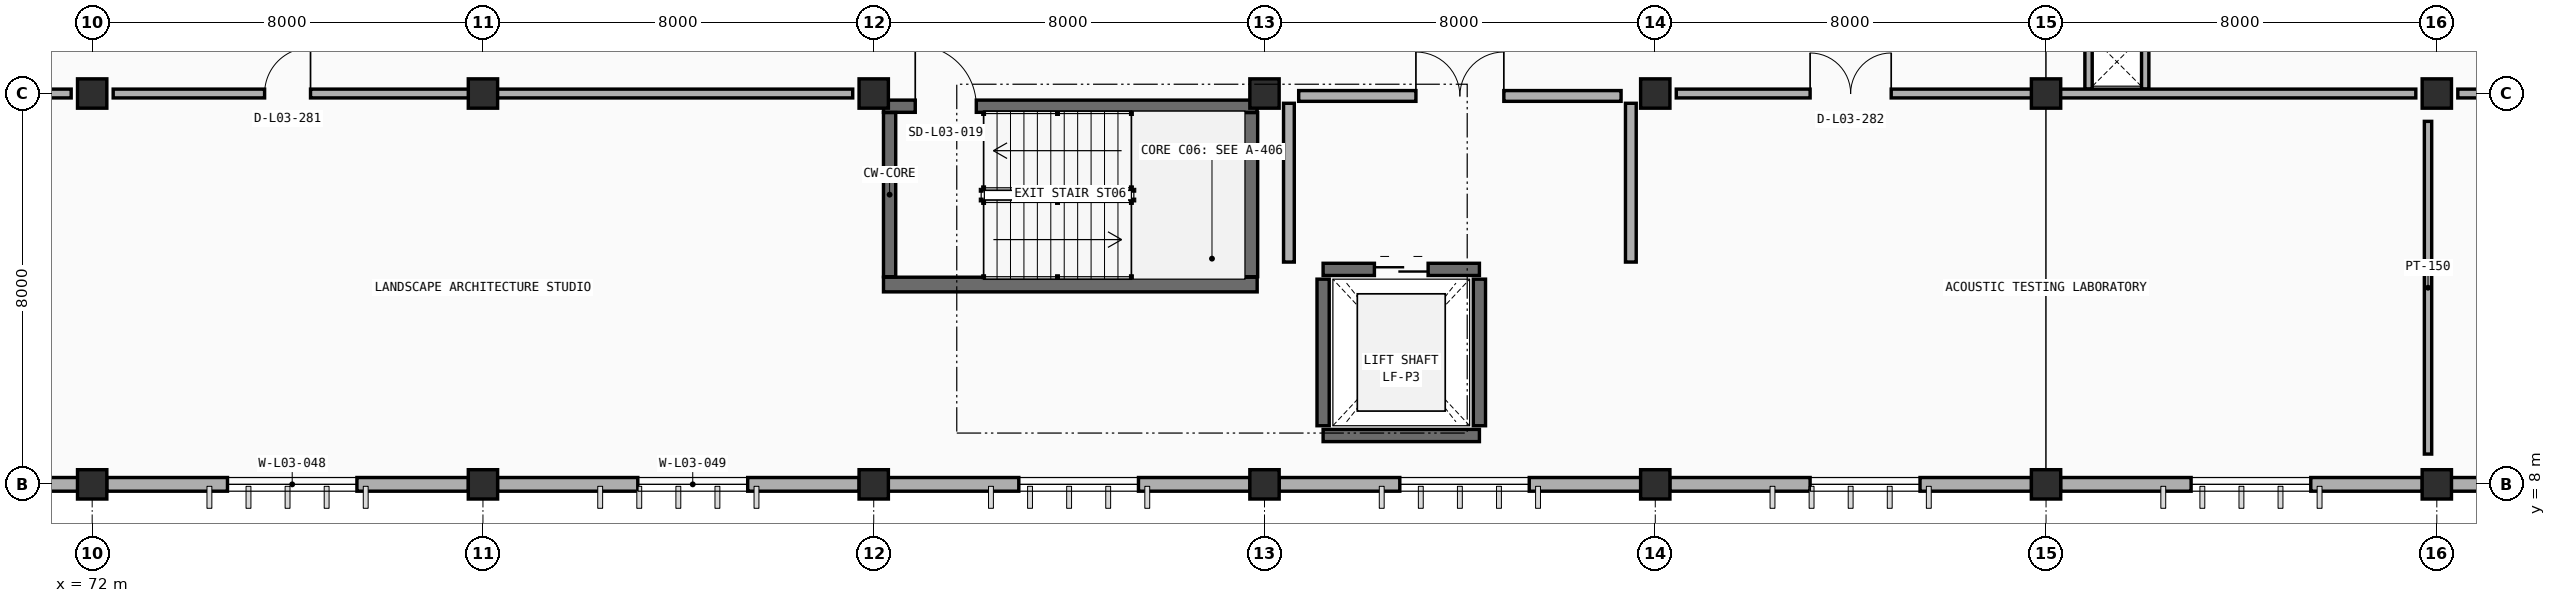
"""IFC4 building model, lengths in metres.
Left out: names, types, materials, properties, quantities, classifications, styles, units other than length and angle.
Written with IfcOpenShell. Run it as: python <this file> out.ifc"""

import sys

from ifc_helpers import new_model, si_unit, direction, frame, frame_2d, origin, origin_2d, place, context, subcontext, project, spatial, rectangle, extrude, element, fill, save


model = new_model("IFC4")
c1 = context("Model", 3, precision=1e-05, world=origin(), true_north=direction((0.0, 1.0)))
c2 = subcontext(c1, "Body", "Model", "MODEL_VIEW")
j1 = project(units=[si_unit("LENGTHUNIT", "METRE"), si_unit("PLANEANGLEUNIT", "RADIAN")], contexts=[c1])
p1 = place(None, origin())
s1 = spatial("IfcSite", under=j1, at=p1, CompositionType="ELEMENT")
p2 = place(p1, origin())
s2 = spatial("IfcBuilding", under=s1, at=p2, CompositionType="ELEMENT")
p3 = place(p2, frame((0.0, 0.0, 9.6)))
s3 = spatial("IfcBuildingStorey", under=s2, at=p3, CompositionType="ELEMENT", Elevation=9.6)
for number, where, z_axis, x_axis in (
    (1, (72.0, 8.0, 0.0), (0.0, 0.0, 1.0), (1.0, 0.0, 0.0)),
    (2, (80.0, 8.0, 0.0), (0.0, 0.0, 1.0), (1.0, 0.0, 0.0)),
    (3, (88.0, 8.0, 0.0), (0.0, 0.0, 1.0), (1.0, 0.0, 0.0)),
    (4, (96.0, 8.0, 0.0), (0.0, 0.0, 1.0), (1.0, 0.0, 0.0)),
    (5, (104.0, 8.0, 0.0), (0.0, 0.0, 1.0), (1.0, 0.0, 0.0)),
    (6, (112.0, 8.0, 0.0), (0.0, 0.0, 1.0), (1.0, 0.0, 0.0)),
    (7, (120.0, 8.0, 0.0), (0.0, 0.0, 1.0), (1.0, 0.0, 0.0)),
    (8, (72.0, 16.0, 0.0), (0.0, 0.0, 1.0), (1.0, 0.0, 0.0)),
    (9, (80.0, 16.0, 0.0), (0.0, 0.0, 1.0), (1.0, 0.0, 0.0)),
    (10, (88.0, 16.0, 0.0), (0.0, 0.0, 1.0), (1.0, 0.0, 0.0)),
    (11, (96.0, 16.0, 0.0), (0.0, 0.0, 1.0), (1.0, 0.0, 0.0)),
    (12, (104.0, 16.0, 0.0), (0.0, 0.0, 1.0), (1.0, 0.0, 0.0)),
    (13, (112.0, 16.0, 0.0), (0.0, 0.0, 1.0), (1.0, 0.0, 0.0)),
    (14, (120.0, 16.0, 0.0), (0.0, 0.0, 1.0), (1.0, 0.0, 0.0)),
):
    element("IfcColumn", number, at=place(p3, frame(where, z_axis=z_axis, x_axis=x_axis)), inside=s3, PredefinedType="COLUMN", context=c2, shape_type="SweptSolid", body=[
        extrude(rectangle(XDim=0.6, YDim=0.6, at=origin_2d()), origin(), (0.0, 0.0, 1.0), 4.2),
    ])
p4 = place(p3, frame((71.703, 8.0, 0.0), z_axis=(0.0, 0.0, 1.0), x_axis=(-1.0, 0.0, 0.0)))
e15 = element("IfcWall", 15, at=p4, inside=s3, PredefinedType="STANDARD", context=c2, shape_type="SweptSolid", body=[
    extrude(rectangle(XDim=7.406, YDim=0.28, at=frame_2d((3.703, 0.0))), origin(), (0.0, 0.0, 1.0), 3.325),
])
p5 = place(p4, frame((2.283, 0.0, 0.9)))
e16 = element("IfcOpeningElement", 16, at=p5, cuts=e15, PredefinedType="OPENING", context=c2, shape_type="SweptSolid", body=[
    extrude(rectangle(XDim=2.45, YDim=1.25, at=frame_2d((1.225, 0.625))), frame((0.0, 0.15, 0.0), z_axis=(0.0, -1.0, 0.0), x_axis=(1.0, 0.0, 0.0)), (0.0, 0.0, 1.0), 0.3),
])
p6 = place(p3, frame((79.703, 8.0, 0.0), z_axis=(0.0, 0.0, 1.0), x_axis=(-1.0, 0.0, 0.0)))
e17 = element("IfcWall", 17, at=p6, inside=s3, PredefinedType="STANDARD", context=c2, shape_type="SweptSolid", body=[
    extrude(rectangle(XDim=7.406, YDim=0.28, at=frame_2d((3.703, 0.0))), origin(), (0.0, 0.0, 1.0), 3.325),
])
p7 = place(p6, frame((2.283, 0.0, 0.9)))
e18 = element("IfcOpeningElement", 18, at=p7, cuts=e17, PredefinedType="OPENING", context=c2, shape_type="SweptSolid", body=[
    extrude(rectangle(XDim=2.65, YDim=1.25, at=frame_2d((1.325, 0.625))), frame((0.0, 0.15, 0.0), z_axis=(0.0, -1.0, 0.0), x_axis=(1.0, 0.0, 0.0)), (0.0, 0.0, 1.0), 0.3),
])
p8 = place(p3, frame((87.703, 8.0, 0.0), z_axis=(0.0, 0.0, 1.0), x_axis=(-1.0, 0.0, 0.0)))
e19 = element("IfcWall", 19, at=p8, inside=s3, PredefinedType="STANDARD", context=c2, shape_type="SweptSolid", body=[
    extrude(rectangle(XDim=7.406, YDim=0.28, at=frame_2d((3.703, 0.0))), origin(), (0.0, 0.0, 1.0), 3.325),
])
p9 = place(p8, frame((2.283, 0.0, 0.9)))
e20 = element("IfcOpeningElement", 20, at=p9, cuts=e19, PredefinedType="OPENING", context=c2, shape_type="SweptSolid", body=[
    extrude(rectangle(XDim=2.25, YDim=1.25, at=frame_2d((1.125, 0.625))), frame((0.0, 0.15, 0.0), z_axis=(0.0, -1.0, 0.0), x_axis=(1.0, 0.0, 0.0)), (0.0, 0.0, 1.0), 0.3),
])
p10 = place(p3, frame((95.703, 8.0, 0.0), z_axis=(0.0, 0.0, 1.0), x_axis=(-1.0, 0.0, 0.0)))
e21 = element("IfcWall", 21, at=p10, inside=s3, PredefinedType="STANDARD", context=c2, shape_type="SweptSolid", body=[
    extrude(rectangle(XDim=7.406, YDim=0.28, at=frame_2d((3.703, 0.0))), origin(), (0.0, 0.0, 1.0), 3.325),
])
p11 = place(p10, frame((2.283, 0.0, 0.9)))
e22 = element("IfcOpeningElement", 22, at=p11, cuts=e21, PredefinedType="OPENING", context=c2, shape_type="SweptSolid", body=[
    extrude(rectangle(XDim=2.45, YDim=1.25, at=frame_2d((1.225, 0.625))), frame((0.0, 0.15, 0.0), z_axis=(0.0, -1.0, 0.0), x_axis=(1.0, 0.0, 0.0)), (0.0, 0.0, 1.0), 0.3),
])
p12 = place(p3, frame((103.703, 8.0, 0.0), z_axis=(0.0, 0.0, 1.0), x_axis=(-1.0, 0.0, 0.0)))
e23 = element("IfcWall", 23, at=p12, inside=s3, PredefinedType="STANDARD", context=c2, shape_type="SweptSolid", body=[
    extrude(rectangle(XDim=7.406, YDim=0.28, at=frame_2d((3.703, 0.0))), origin(), (0.0, 0.0, 1.0), 3.325),
])
p13 = place(p12, frame((2.283, 0.0, 0.9)))
e24 = element("IfcOpeningElement", 24, at=p13, cuts=e23, PredefinedType="OPENING", context=c2, shape_type="SweptSolid", body=[
    extrude(rectangle(XDim=2.65, YDim=1.25, at=frame_2d((1.325, 0.625))), frame((0.0, 0.15, 0.0), z_axis=(0.0, -1.0, 0.0), x_axis=(1.0, 0.0, 0.0)), (0.0, 0.0, 1.0), 0.3),
])
p14 = place(p3, frame((111.703, 8.0, 0.0), z_axis=(0.0, 0.0, 1.0), x_axis=(-1.0, 0.0, 0.0)))
e25 = element("IfcWall", 25, at=p14, inside=s3, PredefinedType="STANDARD", context=c2, shape_type="SweptSolid", body=[
    extrude(rectangle(XDim=7.406, YDim=0.28, at=frame_2d((3.703, 0.0))), origin(), (0.0, 0.0, 1.0), 3.325),
])
p15 = place(p14, frame((2.283, 0.0, 0.9)))
e26 = element("IfcOpeningElement", 26, at=p15, cuts=e25, PredefinedType="OPENING", context=c2, shape_type="SweptSolid", body=[
    extrude(rectangle(XDim=2.25, YDim=1.25, at=frame_2d((1.125, 0.625))), frame((0.0, 0.15, 0.0), z_axis=(0.0, -1.0, 0.0), x_axis=(1.0, 0.0, 0.0)), (0.0, 0.0, 1.0), 0.3),
])
p16 = place(p3, frame((119.703, 8.0, 0.0), z_axis=(0.0, 0.0, 1.0), x_axis=(-1.0, 0.0, 0.0)))
e27 = element("IfcWall", 27, at=p16, inside=s3, PredefinedType="STANDARD", context=c2, shape_type="SweptSolid", body=[
    extrude(rectangle(XDim=7.406, YDim=0.28, at=frame_2d((3.703, 0.0))), origin(), (0.0, 0.0, 1.0), 3.325),
])
p17 = place(p16, frame((2.283, 0.0, 0.9)))
e28 = element("IfcOpeningElement", 28, at=p17, cuts=e27, PredefinedType="OPENING", context=c2, shape_type="SweptSolid", body=[
    extrude(rectangle(XDim=2.45, YDim=1.25, at=frame_2d((1.225, 0.625))), frame((0.0, 0.15, 0.0), z_axis=(0.0, -1.0, 0.0), x_axis=(1.0, 0.0, 0.0)), (0.0, 0.0, 1.0), 0.3),
])
p18 = place(p3, frame((127.703, 8.0, 0.0), z_axis=(0.0, 0.0, 1.0), x_axis=(-1.0, 0.0, 0.0)))
e29 = element("IfcWall", 29, at=p18, inside=s3, PredefinedType="STANDARD", context=c2, shape_type="SweptSolid", body=[
    extrude(rectangle(XDim=7.406, YDim=0.28, at=frame_2d((3.703, 0.0))), origin(), (0.0, 0.0, 1.0), 3.325),
])
p19 = place(p18, frame((2.283, 0.0, 0.9)))
e30 = element("IfcOpeningElement", 30, at=p19, cuts=e29, PredefinedType="OPENING", context=c2, shape_type="SweptSolid", body=[
    extrude(rectangle(XDim=2.65, YDim=1.25, at=frame_2d((1.325, 0.625))), frame((0.0, 0.15, 0.0), z_axis=(0.0, -1.0, 0.0), x_axis=(1.0, 0.0, 0.0)), (0.0, 0.0, 1.0), 0.3),
])
p20 = place(p3, frame((88.2, 12.09, 0.0), z_axis=(0.0, 0.0, 1.0), x_axis=(1.0, 0.0, 0.0)))
e31 = element("IfcWall", 31, at=p20, inside=s3, PredefinedType="SHEAR", context=c2, shape_type="SweptSolid", body=[
    extrude(rectangle(XDim=7.65, YDim=0.3, at=frame_2d((3.825, 0.0))), origin(), (0.0, 0.0, 1.0), 4.2),
])
p21 = place(p3, frame((95.71, 12.25, 0.0), z_axis=(0.0, 0.0, 1.0), x_axis=(0.0, 1.0, 0.0)))
e32 = element("IfcWall", 32, at=p21, inside=s3, PredefinedType="SHEAR", context=c2, shape_type="SweptSolid", body=[
    extrude(rectangle(XDim=3.36, YDim=0.3, at=frame_2d((1.68, 0.0))), origin(), (0.0, 0.0, 1.0), 4.2),
])
p22 = place(p3, frame((88.2, 15.74, 0.0), z_axis=(0.0, 0.0, 1.0), x_axis=(1.0, 0.0, 0.0)))
e33 = element("IfcWall", 33, at=p22, inside=s3, PredefinedType="SOLIDWALL", context=c2, shape_type="SweptSolid", body=[
    extrude(rectangle(XDim=7.65, YDim=0.25, at=frame_2d((3.825, 0.0))), origin(), (0.0, 0.0, 1.0), 4.2),
])
p23 = place(p22, frame((0.65, 0.0, 0.0)))
e34 = element("IfcOpeningElement", 34, at=p23, cuts=e33, PredefinedType="OPENING", context=c2, shape_type="SweptSolid", body=[
    extrude(rectangle(XDim=1.25, YDim=2.15, at=frame_2d((0.625, 1.075))), frame((0.0, 0.135, 0.0), z_axis=(0.0, -1.0, 0.0), x_axis=(1.0, 0.0, 0.0)), (0.0, 0.0, 1.0), 0.27),
])
p24 = place(p3, frame((88.325, 12.25, 0.0), z_axis=(0.0, 0.0, 1.0), x_axis=(0.0, 1.0, 0.0)))
e35 = element("IfcWall", 35, at=p24, inside=s3, PredefinedType="SOLIDWALL", context=c2, shape_type="SweptSolid", body=[
    extrude(rectangle(XDim=3.36, YDim=0.25, at=frame_2d((1.68, 0.0))), origin(), (0.0, 0.0, 1.0), 4.2),
])
p25 = place(p3, frame((97.2, 9.0, 0.0), z_axis=(0.0, 0.0, 1.0), x_axis=(1.0, 0.0, 0.0)))
e36 = element("IfcWall", 36, at=p25, inside=s3, PredefinedType="SOLIDWALL", context=c2, shape_type="SweptSolid", body=[
    extrude(rectangle(XDim=3.2, YDim=0.25, at=frame_2d((1.6, 0.0))), origin(), (0.0, 0.0, 1.0), 4.2),
])
p26 = place(p3, frame((97.2, 12.4, 0.0), z_axis=(0.0, 0.0, 1.0), x_axis=(1.0, 0.0, 0.0)))
e37 = element("IfcWall", 37, at=p26, inside=s3, PredefinedType="SOLIDWALL", context=c2, shape_type="SweptSolid", body=[
    extrude(rectangle(XDim=3.2, YDim=0.25, at=frame_2d((1.6, 0.0))), origin(), (0.0, 0.0, 1.0), 4.2),
])
p27 = place(p26, frame((1.05, 0.0, 0.0)))
e38 = element("IfcOpeningElement", 38, at=p27, cuts=e37, PredefinedType="OPENING", context=c2, shape_type="SweptSolid", body=[
    extrude(rectangle(XDim=1.1, YDim=2.15, at=frame_2d((0.55, 1.075))), frame((0.0, 0.135, 0.0), z_axis=(0.0, -1.0, 0.0), x_axis=(1.0, 0.0, 0.0)), (0.0, 0.0, 1.0), 0.27),
])
for number, where, z_axis, x_axis in (
    (39, (97.2, 9.2, 0.0), (0.0, 0.0, 1.0), (0.0, 1.0, 0.0)),
    (40, (100.4, 9.2, 0.0), (0.0, 0.0, 1.0), (0.0, 1.0, 0.0)),
):
    element("IfcWall", number, at=place(p3, frame(where, z_axis=z_axis, x_axis=x_axis)), inside=s3, PredefinedType="SOLIDWALL", context=c2, shape_type="SweptSolid", body=[
        extrude(rectangle(XDim=3.0, YDim=0.25, at=frame_2d((1.5, 0.0))), origin(), (0.0, 0.0, 1.0), 4.2),
    ])
p28 = place(p3, frame((96.7, 15.95, 0.0), z_axis=(0.0, 0.0, 1.0), x_axis=(1.0, 0.0, 0.0)))
e41 = element("IfcWall", 41, at=p28, inside=s3, PredefinedType="PARTITIONING", context=c2, shape_type="SweptSolid", body=[
    extrude(rectangle(XDim=6.6, YDim=0.22, at=frame_2d((3.3, 0.0))), origin(), (0.0, 0.0, 1.0), 3.275),
])
p29 = place(p28, frame((2.4, 0.0, 0.0)))
e42 = element("IfcOpeningElement", 42, at=p29, cuts=e41, PredefinedType="OPENING", context=c2, shape_type="SweptSolid", body=[
    extrude(rectangle(XDim=1.8, YDim=2.2, at=frame_2d((0.9, 1.1))), frame((0.0, 0.12, 0.0), z_axis=(0.0, -1.0, 0.0), x_axis=(1.0, 0.0, 0.0)), (0.0, 0.0, 1.0), 0.24),
])
for number, where, z_axis, x_axis in (
    (43, (96.5, 12.55, 0.0), (0.0, 0.0, 1.0), (0.0, 1.0, 0.0)),
    (44, (103.5, 12.55, 0.0), (0.0, 0.0, 1.0), (0.0, 1.0, 0.0)),
):
    element("IfcWall", number, at=place(p3, frame(where, z_axis=z_axis, x_axis=x_axis)), inside=s3, PredefinedType="PARTITIONING", context=c2, shape_type="SweptSolid", body=[
        extrude(rectangle(XDim=3.25, YDim=0.22, at=frame_2d((1.625, 0.0))), origin(), (0.0, 0.0, 1.0), 3.225),
    ])
for number, where, z_axis, x_axis in (
    (45, (114.03, 16.09, 0.0), (0.0, 0.0, 1.0), (0.0, 1.0, 0.0)),
    (46, (112.87, 17.23, 0.0), (0.0, 0.0, 1.0), (0.0, -1.0, 0.0)),
):
    element("IfcWall", number, at=place(p3, frame(where, z_axis=z_axis, x_axis=x_axis)), inside=s3, PredefinedType="PARTITIONING", context=c2, shape_type="SweptSolid", body=[
        extrude(rectangle(XDim=1.14, YDim=0.15, at=frame_2d((0.57, 0.0))), origin(), (0.0, 0.0, 1.0), 3.9),
    ])
p30 = place(p3, frame((56.43, 16.0, 0.0), z_axis=(0.0, 0.0, 1.0), x_axis=(1.0, 0.0, 0.0)))
e47 = element("IfcWall", 47, at=p30, inside=s3, PredefinedType="PARTITIONING", context=c2, shape_type="SweptSolid", body=[
    extrude(rectangle(XDim=15.14, YDim=0.18, at=frame_2d((7.57, 0.0))), origin(), (0.0, 0.0, 1.0), 3.275),
])
p31 = place(p30, frame((3.12, 0.0, 0.0)))
e48 = element("IfcOpeningElement", 48, at=p31, cuts=e47, PredefinedType="OPENING", context=c2, shape_type="SweptSolid", body=[
    extrude(rectangle(XDim=0.9, YDim=2.1, at=frame_2d((0.45, 1.05))), frame((0.0, 0.1, 0.0), z_axis=(0.0, -1.0, 0.0), x_axis=(1.0, 0.0, 0.0)), (0.0, 0.0, 1.0), 0.2),
])
p32 = place(p3, frame((72.43, 16.0, 0.0), z_axis=(0.0, 0.0, 1.0), x_axis=(1.0, 0.0, 0.0)))
e49 = element("IfcWall", 49, at=p32, inside=s3, PredefinedType="PARTITIONING", context=c2, shape_type="SweptSolid", body=[
    extrude(rectangle(XDim=15.14, YDim=0.18, at=frame_2d((7.57, 0.0))), origin(), (0.0, 0.0, 1.0), 3.275),
])
p33 = place(p32, frame((3.1, 0.0, 0.0)))
e50 = element("IfcOpeningElement", 50, at=p33, cuts=e49, PredefinedType="OPENING", context=c2, shape_type="SweptSolid", body=[
    extrude(rectangle(XDim=0.94, YDim=2.1, at=frame_2d((0.47, 1.05))), frame((0.0, 0.1, 0.0), z_axis=(0.0, -1.0, 0.0), x_axis=(1.0, 0.0, 0.0)), (0.0, 0.0, 1.0), 0.2),
])
p34 = place(p3, frame((104.43, 16.0, 0.0), z_axis=(0.0, 0.0, 1.0), x_axis=(1.0, 0.0, 0.0)))
e51 = element("IfcWall", 51, at=p34, inside=s3, PredefinedType="PARTITIONING", context=c2, shape_type="SweptSolid", body=[
    extrude(rectangle(XDim=15.14, YDim=0.18, at=frame_2d((7.57, 0.0))), origin(), (0.0, 0.0, 1.0), 3.275),
])
p35 = place(p34, frame((2.74, 0.0, 0.0)))
e52 = element("IfcOpeningElement", 52, at=p35, cuts=e51, PredefinedType="OPENING", context=c2, shape_type="SweptSolid", body=[
    extrude(rectangle(XDim=1.66, YDim=2.22, at=frame_2d((0.83, 1.11))), frame((0.0, 0.1, 0.0), z_axis=(0.0, -1.0, 0.0), x_axis=(1.0, 0.0, 0.0)), (0.0, 0.0, 1.0), 0.2),
])
p36 = place(p3, frame((119.82, 8.62, 0.0), z_axis=(0.0, 0.0, 1.0), x_axis=(0.0, 1.0, 0.0)))
e53 = element("IfcWall", 53, at=p36, inside=s3, PredefinedType="PARTITIONING", context=c2, shape_type="SweptSolid", body=[
    extrude(rectangle(XDim=6.81, YDim=0.15, at=frame_2d((3.405, 0.0))), origin(), (0.0, 0.0, 1.0), 3.225),
])
p37 = place(p3, frame((120.43, 16.0, 0.0), z_axis=(0.0, 0.0, 1.0), x_axis=(1.0, 0.0, 0.0)))
e54 = element("IfcWall", 54, at=p37, inside=s3, PredefinedType="PARTITIONING", context=c2, shape_type="SweptSolid", body=[
    extrude(rectangle(XDim=23.14, YDim=0.18, at=frame_2d((11.57, 0.0))), origin(), (0.0, 0.0, 1.0), 3.275),
])
p38 = place(p37, frame((2.66, 0.0, 0.0)))
e55 = element("IfcOpeningElement", 55, at=p38, cuts=e54, PredefinedType="OPENING", context=c2, shape_type="SweptSolid", body=[
    extrude(rectangle(XDim=1.82, YDim=2.25, at=frame_2d((0.91, 1.125))), frame((0.0, 0.1, 0.0), z_axis=(0.0, -1.0, 0.0), x_axis=(1.0, 0.0, 0.0)), (0.0, 0.0, 1.0), 0.2),
])
p39 = place(p7, origin())
e56 = element("IfcWindow", 56, at=p39, inside=s3, PartitioningType="DOUBLE_PANEL_VERTICAL", PredefinedType="WINDOW", context=c2, shape_type="SweptSolid", body=[
    extrude(rectangle(XDim=2.65, YDim=1.25, at=frame_2d((1.325, 0.625))), frame((0.0, 0.03, 0.0), z_axis=(0.0, -1.0, 0.0), x_axis=(1.0, 0.0, 0.0)), (0.0, 0.0, 1.0), 0.06),
])
fill(e18, e56)
p40 = place(p9, origin())
e57 = element("IfcWindow", 57, at=p40, inside=s3, PartitioningType="DOUBLE_PANEL_VERTICAL", PredefinedType="WINDOW", context=c2, shape_type="SweptSolid", body=[
    extrude(rectangle(XDim=2.25, YDim=1.25, at=frame_2d((1.125, 0.625))), frame((0.0, 0.03, 0.0), z_axis=(0.0, -1.0, 0.0), x_axis=(1.0, 0.0, 0.0)), (0.0, 0.0, 1.0), 0.06),
])
fill(e20, e57)
p41 = place(p11, origin())
e58 = element("IfcWindow", 58, at=p41, inside=s3, PartitioningType="DOUBLE_PANEL_VERTICAL", PredefinedType="WINDOW", context=c2, shape_type="SweptSolid", body=[
    extrude(rectangle(XDim=2.45, YDim=1.25, at=frame_2d((1.225, 0.625))), frame((0.0, 0.03, 0.0), z_axis=(0.0, -1.0, 0.0), x_axis=(1.0, 0.0, 0.0)), (0.0, 0.0, 1.0), 0.06),
])
fill(e22, e58)
p42 = place(p13, origin())
e59 = element("IfcWindow", 59, at=p42, inside=s3, PartitioningType="DOUBLE_PANEL_VERTICAL", PredefinedType="WINDOW", context=c2, shape_type="SweptSolid", body=[
    extrude(rectangle(XDim=2.65, YDim=1.25, at=frame_2d((1.325, 0.625))), frame((0.0, 0.03, 0.0), z_axis=(0.0, -1.0, 0.0), x_axis=(1.0, 0.0, 0.0)), (0.0, 0.0, 1.0), 0.06),
])
fill(e24, e59)
p43 = place(p15, origin())
e60 = element("IfcWindow", 60, at=p43, inside=s3, PartitioningType="DOUBLE_PANEL_VERTICAL", PredefinedType="WINDOW", context=c2, shape_type="SweptSolid", body=[
    extrude(rectangle(XDim=2.25, YDim=1.25, at=frame_2d((1.125, 0.625))), frame((0.0, 0.03, 0.0), z_axis=(0.0, -1.0, 0.0), x_axis=(1.0, 0.0, 0.0)), (0.0, 0.0, 1.0), 0.06),
])
fill(e26, e60)
p44 = place(p17, origin())
e61 = element("IfcWindow", 61, at=p44, inside=s3, PartitioningType="DOUBLE_PANEL_VERTICAL", PredefinedType="WINDOW", context=c2, shape_type="SweptSolid", body=[
    extrude(rectangle(XDim=2.45, YDim=1.25, at=frame_2d((1.225, 0.625))), frame((0.0, 0.03, 0.0), z_axis=(0.0, -1.0, 0.0), x_axis=(1.0, 0.0, 0.0)), (0.0, 0.0, 1.0), 0.06),
])
fill(e28, e61)
p45 = place(p23, origin())
e62 = element("IfcDoor", 62, at=p45, inside=s3, OperationType="SINGLE_SWING_LEFT", PredefinedType="DOOR", context=c2, shape_type="SweptSolid", body=[
    extrude(rectangle(XDim=1.25, YDim=2.15, at=frame_2d((0.625, 1.075))), frame((0.0, 0.025, 0.0), z_axis=(0.0, -1.0, 0.0), x_axis=(1.0, 0.0, 0.0)), (0.0, 0.0, 1.0), 0.05),
])
fill(e34, e62)
p46 = place(p27, origin())
e63 = element("IfcDoor", 63, at=p46, inside=s3, OperationType="DOUBLE_DOOR_SLIDING", PredefinedType="DOOR", context=c2, shape_type="SweptSolid", body=[
    extrude(rectangle(XDim=1.1, YDim=2.15, at=frame_2d((0.55, 1.075))), frame((0.0, 0.025, 0.0), z_axis=(0.0, -1.0, 0.0), x_axis=(1.0, 0.0, 0.0)), (0.0, 0.0, 1.0), 0.05),
])
fill(e38, e63)
p47 = place(p29, origin())
e64 = element("IfcDoor", 64, at=p47, inside=s3, OperationType="DOUBLE_DOOR_SINGLE_SWING", PredefinedType="DOOR", context=c2, shape_type="SweptSolid", body=[
    extrude(rectangle(XDim=1.8, YDim=2.2, at=frame_2d((0.9, 1.1))), frame((0.0, 0.025, 0.0), z_axis=(0.0, -1.0, 0.0), x_axis=(1.0, 0.0, 0.0)), (0.0, 0.0, 1.0), 0.05),
])
fill(e42, e64)
p48 = place(p33, origin())
e65 = element("IfcDoor", 65, at=p48, inside=s3, OperationType="SINGLE_SWING_RIGHT", PredefinedType="DOOR", context=c2, shape_type="SweptSolid", body=[
    extrude(rectangle(XDim=0.94, YDim=2.1, at=frame_2d((0.47, 1.05))), frame((0.0, 0.025, 0.0), z_axis=(0.0, -1.0, 0.0), x_axis=(1.0, 0.0, 0.0)), (0.0, 0.0, 1.0), 0.05),
])
fill(e50, e65)
p49 = place(p35, origin())
e66 = element("IfcDoor", 66, at=p49, inside=s3, OperationType="DOUBLE_DOOR_SINGLE_SWING", PredefinedType="DOOR", context=c2, shape_type="SweptSolid", body=[
    extrude(rectangle(XDim=1.66, YDim=2.22, at=frame_2d((0.83, 1.11))), frame((0.0, 0.025, 0.0), z_axis=(0.0, -1.0, 0.0), x_axis=(1.0, 0.0, 0.0)), (0.0, 0.0, 1.0), 0.05),
])
fill(e52, e66)
save(model, sys.argv[1])
